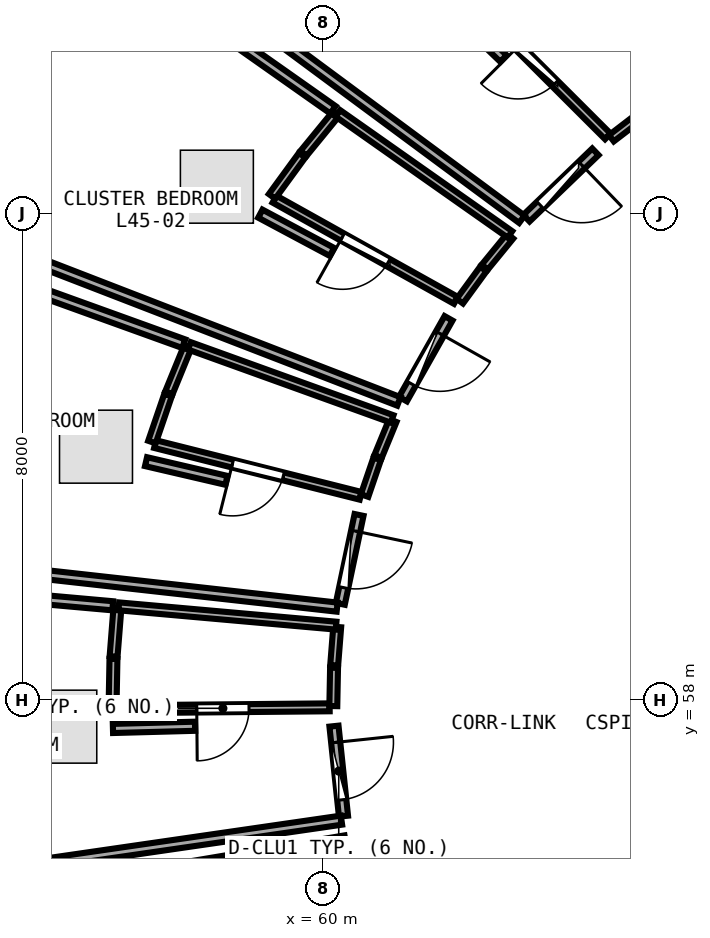
"""IFC4 building model, lengths in metres.
Left out: names, types, materials, properties, quantities, classifications, styles, units other than length and angle.
Written with IfcOpenShell. Run it as: python <this file> out.ifc"""

import sys

from ifc_helpers import new_model, si_unit, direction, frame, frame_2d, origin, place, context, subcontext, project, spatial, rectangle, extrude, element, fill, save


model = new_model("IFC4")
c1 = context("Model", 3, precision=1e-05, world=origin(), true_north=direction((0.0, 1.0)))
c2 = subcontext(c1, "Body", "Model", "MODEL_VIEW")
j1 = project(units=[si_unit("LENGTHUNIT", "METRE"), si_unit("PLANEANGLEUNIT", "RADIAN")], contexts=[c1])
p1 = place(None, origin())
s1 = spatial("IfcSite", under=j1, at=p1, CompositionType="ELEMENT")
p2 = place(p1, origin())
s2 = spatial("IfcBuilding", under=s1, at=p2, CompositionType="ELEMENT")
p3 = place(p2, frame((0.0, 0.0, 176.85)))
s3 = spatial("IfcBuildingStorey", under=s2, at=p3, CompositionType="ELEMENT", Elevation=176.85)
p4 = place(p3, frame((56.679, 71.1, 0.0), z_axis=(0.0, 0.0, 1.0), x_axis=(-0.538801521808, -0.842432739213, 0.0)))
e1 = element("IfcWall", 1, at=p4, inside=s3, PredefinedType="SOLIDWALL", context=c2, shape_type="SweptSolid", body=[
    extrude(rectangle(XDim=7.253, YDim=0.26, at=frame_2d((3.627, 0.0))), origin(), (0.0, 0.0, 1.0), 3.475),
])
p5 = place(p4, frame((3.152, 0.0, 0.0)))
e2 = element("IfcOpeningElement", 2, at=p5, cuts=e1, PredefinedType="OPENING", context=c2, shape_type="SweptSolid", body=[
    extrude(rectangle(XDim=0.95, YDim=2.1, at=frame_2d((0.475, 1.05))), frame((0.0, 0.14, 0.0), z_axis=(0.0, -1.0, 0.0), x_axis=(1.0, 0.0, 0.0)), (0.0, 0.0, 1.0), 0.28),
])
p6 = place(p4, frame((4.452, 0.0, 0.85)))
e3 = element("IfcOpeningElement", 3, at=p6, cuts=e1, PredefinedType="OPENING", context=c2, shape_type="SweptSolid", body=[
    extrude(rectangle(XDim=1.2, YDim=1.45, at=frame_2d((0.6, 0.725))), frame((0.0, 0.14, 0.0), z_axis=(0.0, -1.0, 0.0), x_axis=(1.0, 0.0, 0.0)), (0.0, 0.0, 1.0), 0.28),
])
p7 = place(p3, frame((64.687, 67.266, 0.0), z_axis=(0.0, 0.0, 1.0), x_axis=(-0.707694933746, 0.706518139011, 0.0)))
e4 = element("IfcWall", 4, at=p7, inside=s3, PredefinedType="PLUMBINGWALL", context=c2, shape_type="SweptSolid", body=[
    extrude(rectangle(XDim=3.319, YDim=0.13, at=frame_2d((1.66, 0.0))), origin(), (0.0, 0.0, 1.0), 3.175),
])
p8 = place(p7, frame((1.23, 0.0, 0.0)))
e5 = element("IfcOpeningElement", 5, at=p8, cuts=e4, PredefinedType="OPENING", context=c2, shape_type="SweptSolid", body=[
    extrude(rectangle(XDim=0.86, YDim=2.05, at=frame_2d((0.43, 1.025))), frame((0.0, 0.075, 0.0), z_axis=(0.0, -1.0, 0.0), x_axis=(1.0, 0.0, 0.0)), (0.0, 0.0, 1.0), 0.15),
])
p9 = place(p3, frame((64.482, 67.013, 0.0), z_axis=(0.0, 0.0, 1.0), x_axis=(-0.720543985977, -0.693409232901, 0.0)))
e6 = element("IfcWall", 6, at=p9, inside=s3, PredefinedType="PARTITIONING", context=c2, shape_type="SweptSolid", body=[
    extrude(rectangle(XDim=1.574, YDim=0.15, at=frame_2d((0.787, 0.0))), origin(), (0.0, 0.0, 1.0), 2.975),
])
p10 = place(p9, frame((0.312, 0.0, 0.0)))
e7 = element("IfcOpeningElement", 7, at=p10, cuts=e6, PredefinedType="OPENING", context=c2, shape_type="SweptSolid", body=[
    extrude(rectangle(XDim=0.95, YDim=2.08, at=frame_2d((0.475, 1.04))), frame((0.0, 0.085, 0.0), z_axis=(0.0, -1.0, 0.0), x_axis=(1.0, 0.0, 0.0)), (0.0, 0.0, 1.0), 0.17),
])
p11 = place(p3, frame((62.188, 64.57, 0.0), z_axis=(0.0, 0.0, 1.0), x_axis=(-0.873255694646, 0.487262241271, 0.0)))
e8 = element("IfcWall", 8, at=p11, inside=s3, PredefinedType="PLUMBINGWALL", context=c2, shape_type="SweptSolid", body=[
    extrude(rectangle(XDim=3.416, YDim=0.13, at=frame_2d((1.708, 0.0))), origin(), (0.0, 0.0, 1.0), 2.975),
])
p12 = place(p11, frame((1.278, 0.0, 0.0)))
e9 = element("IfcOpeningElement", 9, at=p12, cuts=e8, PredefinedType="OPENING", context=c2, shape_type="SweptSolid", body=[
    extrude(rectangle(XDim=0.86, YDim=2.05, at=frame_2d((0.43, 1.025))), frame((0.0, 0.075, 0.0), z_axis=(0.0, -1.0, 0.0), x_axis=(1.0, 0.0, 0.0)), (0.0, 0.0, 1.0), 0.15),
])
p13 = place(p3, frame((62.066, 64.275, 0.0), z_axis=(0.0, 0.0, 1.0), x_axis=(-0.491582624537, -0.870830938388, 0.0)))
e10 = element("IfcWall", 10, at=p13, inside=s3, PredefinedType="PARTITIONING", context=c2, shape_type="SweptSolid", body=[
    extrude(rectangle(XDim=1.526, YDim=0.15, at=frame_2d((0.763, 0.0))), origin(), (0.0, 0.0, 1.0), 3.235),
])
p14 = place(p13, frame((0.288, 0.0, 0.0)))
e11 = element("IfcOpeningElement", 11, at=p14, cuts=e10, PredefinedType="OPENING", context=c2, shape_type="SweptSolid", body=[
    extrude(rectangle(XDim=0.95, YDim=2.08, at=frame_2d((0.475, 1.04))), frame((0.0, 0.085, 0.0), z_axis=(0.0, -1.0, 0.0), x_axis=(1.0, 0.0, 0.0)), (0.0, 0.0, 1.0), 0.17),
])
p15 = place(p3, frame((60.621, 61.356, 0.0), z_axis=(0.0, 0.0, 1.0), x_axis=(-0.969774737706, 0.244001963326, 0.0)))
e12 = element("IfcWall", 12, at=p15, inside=s3, PredefinedType="PLUMBINGWALL", context=c2, shape_type="SweptSolid", body=[
    extrude(rectangle(XDim=3.486, YDim=0.13, at=frame_2d((1.743, 0.0))), origin(), (0.0, 0.0, 1.0), 3.175),
])
p16 = place(p15, frame((1.313, 0.0, 0.0)))
e13 = element("IfcOpeningElement", 13, at=p16, cuts=e12, PredefinedType="OPENING", context=c2, shape_type="SweptSolid", body=[
    extrude(rectangle(XDim=0.86, YDim=2.05, at=frame_2d((0.43, 1.025))), frame((0.0, 0.075, 0.0), z_axis=(0.0, -1.0, 0.0), x_axis=(1.0, 0.0, 0.0)), (0.0, 0.0, 1.0), 0.15),
])
p17 = place(p3, frame((60.594, 61.041, 0.0), z_axis=(0.0, 0.0, 1.0), x_axis=(-0.206257580925, -0.978497731378, 0.0)))
e14 = element("IfcWall", 14, at=p17, inside=s3, PredefinedType="PARTITIONING", context=c2, shape_type="SweptSolid", body=[
    extrude(rectangle(XDim=1.494, YDim=0.15, at=frame_2d((0.747, 0.0))), origin(), (0.0, 0.0, 1.0), 3.48),
])
p18 = place(p17, frame((0.272, 0.0, 0.0)))
e15 = element("IfcOpeningElement", 15, at=p18, cuts=e14, PredefinedType="OPENING", context=c2, shape_type="SweptSolid", body=[
    extrude(rectangle(XDim=0.95, YDim=2.08, at=frame_2d((0.475, 1.04))), frame((0.0, 0.085, 0.0), z_axis=(0.0, -1.0, 0.0), x_axis=(1.0, 0.0, 0.0)), (0.0, 0.0, 1.0), 0.17),
])
p19 = place(p3, frame((60.111, 57.877, 0.0), z_axis=(0.0, 0.0, 1.0), x_axis=(-0.999958513443, -0.009108863449, 0.0)))
e16 = element("IfcWall", 16, at=p19, inside=s3, PredefinedType="PLUMBINGWALL", context=c2, shape_type="SweptSolid", body=[
    extrude(rectangle(XDim=3.511, YDim=0.13, at=frame_2d((1.756, 0.0))), origin(), (0.0, 0.0, 1.0), 2.975),
])
p20 = place(p19, frame((1.326, 0.0, 0.0)))
e17 = element("IfcOpeningElement", 17, at=p20, cuts=e16, PredefinedType="OPENING", context=c2, shape_type="SweptSolid", body=[
    extrude(rectangle(XDim=0.86, YDim=2.05, at=frame_2d((0.43, 1.025))), frame((0.0, 0.075, 0.0), z_axis=(0.0, -1.0, 0.0), x_axis=(1.0, 0.0, 0.0)), (0.0, 0.0, 1.0), 0.15),
])
p21 = place(p3, frame((60.182, 57.568, 0.0), z_axis=(0.0, 0.0, 1.0), x_axis=(0.104940843895, -0.994478465972, 0.0)))
e18 = element("IfcWall", 18, at=p21, inside=s3, PredefinedType="PARTITIONING", context=c2, shape_type="SweptSolid", body=[
    extrude(rectangle(XDim=1.489, YDim=0.15, at=frame_2d((0.745, 0.0))), origin(), (0.0, 0.0, 1.0), 3.48),
])
p22 = place(p21, frame((0.269, 0.0, 0.0)))
e19 = element("IfcOpeningElement", 19, at=p22, cuts=e18, PredefinedType="OPENING", context=c2, shape_type="SweptSolid", body=[
    extrude(rectangle(XDim=0.95, YDim=2.08, at=frame_2d((0.475, 1.04))), frame((0.0, 0.085, 0.0), z_axis=(0.0, -1.0, 0.0), x_axis=(1.0, 0.0, 0.0)), (0.0, 0.0, 1.0), 0.17),
])
p23 = place(p3, frame((60.423, 55.673, 0.0), z_axis=(0.0, 0.0, 1.0), x_axis=(0.338221551274, -0.941066513193, 0.0)))
e20 = element("IfcWall", 20, at=p23, inside=s3, PredefinedType="PARTITIONING", context=c2, shape_type="SweptSolid", body=[
    extrude(rectangle(XDim=3.108, YDim=0.12, at=frame_2d((1.554, 0.0))), origin(), (0.0, 0.0, 1.0), 3.235),
])
p24 = place(p23, frame((1.104, 0.0, 0.0)))
e21 = element("IfcOpeningElement", 21, at=p24, cuts=e20, PredefinedType="OPENING", context=c2, shape_type="SweptSolid", body=[
    extrude(rectangle(XDim=0.9, YDim=2.08, at=frame_2d((0.45, 1.04))), frame((0.0, 0.07, 0.0), z_axis=(0.0, -1.0, 0.0), x_axis=(1.0, 0.0, 0.0)), (0.0, 0.0, 1.0), 0.14),
])
p25 = place(p3, frame((66.242, 68.337, 0.0), z_axis=(0.0, 0.0, 1.0), x_axis=(-0.598416617992, 0.801185091793, 0.0)))
e22 = element("IfcWall", 22, at=p25, inside=s3, PredefinedType="PARTITIONING", context=c2, shape_type="SweptSolid", body=[
    extrude(rectangle(XDim=7.629, YDim=0.1, at=frame_2d((3.814, 0.0))), origin(), (0.0, 0.0, 1.0), 2.975),
])
p26 = place(p3, frame((65.281, 67.648, 0.0), z_axis=(0.0, 0.0, 1.0), x_axis=(-0.793187600036, -0.608977365055, 0.0)))
e23 = element("IfcWall", 23, at=p26, inside=s3, PredefinedType="PLUMBINGWALL", context=c2, shape_type="SweptSolid", body=[
    extrude(rectangle(XDim=0.676, YDim=0.13, at=frame_2d((0.338, 0.0))), origin(), (0.0, 0.0, 1.0), 2.975),
])
p27 = place(p3, frame((63.773, 70.706, 0.0), z_axis=(0.0, 0.0, 1.0), x_axis=(0.625916574892, -0.779890018704, 0.0)))
e24 = element("IfcWall", 24, at=p27, inside=s3, PredefinedType="PLUMBINGWALL", context=c2, shape_type="SweptSolid", body=[
    extrude(rectangle(XDim=3.362, YDim=0.13, at=frame_2d((1.681, 0.0))), origin(), (0.0, 0.0, 1.0), 2.975),
])
p28 = place(p3, frame((63.272, 65.904, 0.0), z_axis=(0.0, 0.0, 1.0), x_axis=(-0.803728632682, 0.594996037808, 0.0)))
e25 = element("IfcWall", 25, at=p28, inside=s3, PredefinedType="PARTITIONING", context=c2, shape_type="SweptSolid", body=[
    extrude(rectangle(XDim=6.886, YDim=0.15, at=frame_2d((3.443, 0.0))), origin(), (0.0, 0.0, 1.0), 3.175),
])
p29 = place(p3, frame((62.039, 69.441, 0.0), z_axis=(0.0, 0.0, 1.0), x_axis=(0.721428898705, -0.692488515511, 0.0)))
e26 = element("IfcWall", 26, at=p29, inside=s3, PredefinedType="PARTITIONING", context=c2, shape_type="SweptSolid", body=[
    extrude(rectangle(XDim=1.291, YDim=0.15, at=frame_2d((0.646, 0.0))), origin(), (0.0, 0.0, 1.0), 3.175),
])
p30 = place(p3, frame((63.08, 65.627, 0.0), z_axis=(0.0, 0.0, 1.0), x_axis=(-0.633641038052, -0.773627193741, 0.0)))
e27 = element("IfcWall", 27, at=p30, inside=s3, PredefinedType="PLUMBINGWALL", context=c2, shape_type="SweptSolid", body=[
    extrude(rectangle(XDim=0.659, YDim=0.13, at=frame_2d((0.33, 0.0))), origin(), (0.0, 0.0, 1.0), 3.48),
])
p31 = place(p3, frame((62.638, 65.086, 0.0), z_axis=(0.0, 0.0, 1.0), x_axis=(-0.590053970957, -0.807363803596, 0.0)))
e28 = element("IfcWall", 28, at=p31, inside=s3, PredefinedType="PLUMBINGWALL", context=c2, shape_type="SweptSolid", body=[
    extrude(rectangle(XDim=0.655, YDim=0.13, at=frame_2d((0.328, 0.0))), origin(), (0.0, 0.0, 1.0), 2.975),
])
p32 = place(p3, frame((59.164, 66.28, 0.0), z_axis=(0.0, 0.0, 1.0), x_axis=(0.589885116714, 0.807487181991, 0.0)))
e29 = element("IfcWall", 29, at=p32, inside=s3, PredefinedType="PLUMBINGWALL", context=c2, shape_type="SweptSolid", body=[
    extrude(rectangle(XDim=0.838, YDim=0.13, at=frame_2d((0.419, 0.0))), origin(), (0.0, 0.0, 1.0), 3.48),
])
p33 = place(p3, frame((59.683, 66.989, 0.0), z_axis=(0.0, 0.0, 1.0), x_axis=(0.633474035481, 0.773763947449, 0.0)))
e30 = element("IfcWall", 30, at=p33, inside=s3, PredefinedType="PLUMBINGWALL", context=c2, shape_type="SweptSolid", body=[
    extrude(rectangle(XDim=0.844, YDim=0.13, at=frame_2d((0.422, 0.0))), origin(), (0.0, 0.0, 1.0), 3.175),
])
p34 = place(p3, frame((60.246, 67.646, 0.0), z_axis=(0.0, 0.0, 1.0), x_axis=(0.817907250539, -0.575350093, 0.0)))
e31 = element("IfcWall", 31, at=p34, inside=s3, PredefinedType="PLUMBINGWALL", context=c2, shape_type="SweptSolid", body=[
    extrude(rectangle(XDim=3.46, YDim=0.13, at=frame_2d((1.73, 0.0))), origin(), (0.0, 0.0, 1.0), 3.175),
])
p35 = place(p3, frame((61.25, 62.908, 0.0), z_axis=(0.0, 0.0, 1.0), x_axis=(-0.932687580633, 0.360685287936, 0.0)))
e32 = element("IfcWall", 32, at=p35, inside=s3, PredefinedType="PARTITIONING", context=c2, shape_type="SweptSolid", body=[
    extrude(rectangle(XDim=8.052, YDim=0.15, at=frame_2d((4.026, 0.0))), origin(), (0.0, 0.0, 1.0), 2.975),
])
p36 = place(p3, frame((56.62, 70.201, 0.0), z_axis=(0.0, 0.0, 1.0), x_axis=(0.817617957458, -0.575761127241, 0.0)))
e33 = element("IfcWall", 33, at=p36, inside=s3, PredefinedType="PARTITIONING", context=c2, shape_type="SweptSolid", body=[
    extrude(rectangle(XDim=4.337, YDim=0.15, at=frame_2d((2.168, 0.0))), origin(), (0.0, 0.0, 1.0), 3.025),
])
p37 = place(p3, frame((58.971, 65.996, 0.0), z_axis=(0.0, 0.0, 1.0), x_axis=(0.882039066957, -0.471176277376, 0.0)))
e34 = element("IfcWall", 34, at=p37, inside=s3, PredefinedType="PARTITIONING", context=c2, shape_type="SweptSolid", body=[
    extrude(rectangle(XDim=1.336, YDim=0.15, at=frame_2d((0.668, 0.0))), origin(), (0.0, 0.0, 1.0), 3.175),
])
p38 = place(p3, frame((61.15, 62.594, 0.0), z_axis=(0.0, 0.0, 1.0), x_axis=(-0.38036677213, -0.924835725229, 0.0)))
e35 = element("IfcWall", 35, at=p38, inside=s3, PredefinedType="PLUMBINGWALL", context=c2, shape_type="SweptSolid", body=[
    extrude(rectangle(XDim=0.641, YDim=0.13, at=frame_2d((0.321, 0.0))), origin(), (0.0, 0.0, 1.0), 3.235),
])
p39 = place(p3, frame((60.893, 61.964, 0.0), z_axis=(0.0, 0.0, 1.0), x_axis=(-0.324128876048, -0.94601293422, 0.0)))
e36 = element("IfcWall", 36, at=p39, inside=s3, PredefinedType="PLUMBINGWALL", context=c2, shape_type="SweptSolid", body=[
    extrude(rectangle(XDim=0.639, YDim=0.13, at=frame_2d((0.319, 0.0))), origin(), (0.0, 0.0, 1.0), 3.48),
])
p40 = place(p3, frame((57.188, 62.24, 0.0), z_axis=(0.0, 0.0, 1.0), x_axis=(0.324370140969, 0.945930236142, 0.0)))
e37 = element("IfcWall", 37, at=p40, inside=s3, PredefinedType="PLUMBINGWALL", context=c2, shape_type="SweptSolid", body=[
    extrude(rectangle(XDim=0.817, YDim=0.13, at=frame_2d((0.409, 0.0))), origin(), (0.0, 0.0, 1.0), 3.48),
])
p41 = place(p3, frame((57.468, 63.051, 0.0), z_axis=(0.0, 0.0, 1.0), x_axis=(0.378505488692, 0.92559904658, 0.0)))
e38 = element("IfcWall", 38, at=p41, inside=s3, PredefinedType="PLUMBINGWALL", context=c2, shape_type="SweptSolid", body=[
    extrude(rectangle(XDim=0.821, YDim=0.13, at=frame_2d((0.411, 0.0))), origin(), (0.0, 0.0, 1.0), 3.48),
])
p42 = place(p3, frame((57.805, 63.822, 0.0), z_axis=(0.0, 0.0, 1.0), x_axis=(0.940709042882, -0.339214528935, 0.0)))
e39 = element("IfcWall", 39, at=p42, inside=s3, PredefinedType="PLUMBINGWALL", context=c2, shape_type="SweptSolid", body=[
    extrude(rectangle(XDim=3.545, YDim=0.13, at=frame_2d((1.772, 0.0))), origin(), (0.0, 0.0, 1.0), 3.175),
])
p43 = place(p3, frame((60.234, 59.525, 0.0), z_axis=(0.0, 0.0, 1.0), x_axis=(-0.99385157858, 0.110720548017, 0.0)))
e40 = element("IfcWall", 40, at=p43, inside=s3, PredefinedType="PARTITIONING", context=c2, shape_type="SweptSolid", body=[
    extrude(rectangle(XDim=8.158, YDim=0.15, at=frame_2d((4.079, 0.0))), origin(), (0.0, 0.0, 1.0), 3.025),
])
p44 = place(p3, frame((53.535, 65.365, 0.0), z_axis=(0.0, 0.0, 1.0), x_axis=(0.940657292565, -0.339358008517, 0.0)))
e41 = element("IfcWall", 41, at=p44, inside=s3, PredefinedType="PARTITIONING", context=c2, shape_type="SweptSolid", body=[
    extrude(rectangle(XDim=4.44, YDim=0.15, at=frame_2d((2.22, 0.0))), origin(), (0.0, 0.0, 1.0), 2.975),
])
p45 = place(p3, frame((57.091, 61.918, 0.0), z_axis=(0.0, 0.0, 1.0), x_axis=(0.973980333704, -0.226632543023, 0.0)))
e42 = element("IfcWall", 42, at=p45, inside=s3, PredefinedType="PARTITIONING", context=c2, shape_type="SweptSolid", body=[
    extrude(rectangle(XDim=1.357, YDim=0.15, at=frame_2d((0.679, 0.0))), origin(), (0.0, 0.0, 1.0), 3.175),
])
p46 = place(p3, frame((60.235, 59.199, 0.0), z_axis=(0.0, 0.0, 1.0), x_axis=(-0.078763069799, -0.996893363824, 0.0)))
e43 = element("IfcWall", 43, at=p46, inside=s3, PredefinedType="PLUMBINGWALL", context=c2, shape_type="SweptSolid", body=[
    extrude(rectangle(XDim=0.632, YDim=0.13, at=frame_2d((0.316, 0.0))), origin(), (0.0, 0.0, 1.0), 3.48),
])
p47 = place(p3, frame((60.184, 58.529, 0.0), z_axis=(0.0, 0.0, 1.0), x_axis=(-0.019338742534, -0.999812989032, 0.0)))
e44 = element("IfcWall", 44, at=p47, inside=s3, PredefinedType="PLUMBINGWALL", context=c2, shape_type="SweptSolid", body=[
    extrude(rectangle(XDim=0.631, YDim=0.13, at=frame_2d((0.315, 0.0))), origin(), (0.0, 0.0, 1.0), 2.975),
])
p48 = place(p3, frame((56.54, 57.865, 0.0), z_axis=(0.0, 0.0, 1.0), x_axis=(0.019006825377, 0.999819353978, 0.0)))
e45 = element("IfcWall", 45, at=p48, inside=s3, PredefinedType="PLUMBINGWALL", context=c2, shape_type="SweptSolid", body=[
    extrude(rectangle(XDim=0.809, YDim=0.13, at=frame_2d((0.405, 0.0))), origin(), (0.0, 0.0, 1.0), 2.975),
])
p49 = place(p3, frame((56.558, 58.714, 0.0), z_axis=(0.0, 0.0, 1.0), x_axis=(0.078797232985, 0.996890664052, 0.0)))
e46 = element("IfcWall", 46, at=p49, inside=s3, PredefinedType="PLUMBINGWALL", context=c2, shape_type="SweptSolid", body=[
    extrude(rectangle(XDim=0.809, YDim=0.13, at=frame_2d((0.404, 0.0))), origin(), (0.0, 0.0, 1.0), 3.48),
])
p50 = place(p3, frame((56.643, 59.538, 0.0), z_axis=(0.0, 0.0, 1.0), x_axis=(0.99608063721, -0.088449783359, 0.0)))
e47 = element("IfcWall", 47, at=p50, inside=s3, PredefinedType="PLUMBINGWALL", context=c2, shape_type="SweptSolid", body=[
    extrude(rectangle(XDim=3.588, YDim=0.13, at=frame_2d((1.794, 0.0))), origin(), (0.0, 0.0, 1.0), 3.175),
])
p51 = place(p3, frame((60.305, 56.022, 0.0), z_axis=(0.0, 0.0, 1.0), x_axis=(-0.989635565405, -0.143601698061, 0.0)))
e48 = element("IfcWall", 48, at=p51, inside=s3, PredefinedType="PARTITIONING", context=c2, shape_type="SweptSolid", body=[
    extrude(rectangle(XDim=8.15, YDim=0.15, at=frame_2d((4.075, 0.0))), origin(), (0.0, 0.0, 1.0), 3.025),
])
p52 = place(p3, frame((52.066, 59.947, 0.0), z_axis=(0.0, 0.0, 1.0), x_axis=(0.996054097512, -0.088748153952, 0.0)))
e49 = element("IfcWall", 49, at=p52, inside=s3, PredefinedType="PARTITIONING", context=c2, shape_type="SweptSolid", body=[
    extrude(rectangle(XDim=4.495, YDim=0.15, at=frame_2d((2.248, 0.0))), origin(), (0.0, 0.0, 1.0), 3.025),
])
p53 = place(p3, frame((56.547, 57.53, 0.0), z_axis=(0.0, 0.0, 1.0), x_axis=(0.999637471643, 0.026924436601, 0.0)))
e50 = element("IfcWall", 50, at=p53, inside=s3, PredefinedType="PARTITIONING", context=c2, shape_type="SweptSolid", body=[
    extrude(rectangle(XDim=1.351, YDim=0.15, at=frame_2d((0.676, 0.0))), origin(), (0.0, 0.0, 1.0), 3.175),
])
p54 = place(p3, frame((52.331, 54.374, 0.0), z_axis=(0.0, 0.0, 1.0), x_axis=(0.986190638786, 0.165614081438, 0.0)))
e51 = element("IfcWall", 51, at=p54, inside=s3, PredefinedType="PARTITIONING", context=c2, shape_type="SweptSolid", body=[
    extrude(rectangle(XDim=8.145, YDim=0.1, at=frame_2d((4.072, 0.0))), origin(), (0.0, 0.0, 1.0), 3.025),
])
p55 = place(p8, origin())
e52 = element("IfcDoor", 52, at=p55, inside=s3, OperationType="SINGLE_SWING_RIGHT", PredefinedType="DOOR", context=c2, shape_type="SweptSolid", body=[
    extrude(rectangle(XDim=0.86, YDim=2.05, at=frame_2d((0.43, 1.025))), frame((0.0, 0.025, 0.0), z_axis=(0.0, -1.0, 0.0), x_axis=(1.0, 0.0, 0.0)), (0.0, 0.0, 1.0), 0.05),
])
fill(e5, e52)
p56 = place(p10, origin())
e53 = element("IfcDoor", 53, at=p56, inside=s3, OperationType="SINGLE_SWING_LEFT", PredefinedType="DOOR", context=c2, shape_type="SweptSolid", body=[
    extrude(rectangle(XDim=0.95, YDim=2.08, at=frame_2d((0.475, 1.04))), frame((0.0, 0.025, 0.0), z_axis=(0.0, -1.0, 0.0), x_axis=(1.0, 0.0, 0.0)), (0.0, 0.0, 1.0), 0.05),
])
fill(e7, e53)
p57 = place(p12, origin())
e54 = element("IfcDoor", 54, at=p57, inside=s3, OperationType="SINGLE_SWING_RIGHT", PredefinedType="DOOR", context=c2, shape_type="SweptSolid", body=[
    extrude(rectangle(XDim=0.86, YDim=2.05, at=frame_2d((0.43, 1.025))), frame((0.0, 0.025, 0.0), z_axis=(0.0, -1.0, 0.0), x_axis=(1.0, 0.0, 0.0)), (0.0, 0.0, 1.0), 0.05),
])
fill(e9, e54)
p58 = place(p14, origin())
e55 = element("IfcDoor", 55, at=p58, inside=s3, OperationType="SINGLE_SWING_LEFT", PredefinedType="DOOR", context=c2, shape_type="SweptSolid", body=[
    extrude(rectangle(XDim=0.95, YDim=2.08, at=frame_2d((0.475, 1.04))), frame((0.0, 0.025, 0.0), z_axis=(0.0, -1.0, 0.0), x_axis=(1.0, 0.0, 0.0)), (0.0, 0.0, 1.0), 0.05),
])
fill(e11, e55)
p59 = place(p16, origin())
e56 = element("IfcDoor", 56, at=p59, inside=s3, OperationType="SINGLE_SWING_RIGHT", PredefinedType="DOOR", context=c2, shape_type="SweptSolid", body=[
    extrude(rectangle(XDim=0.86, YDim=2.05, at=frame_2d((0.43, 1.025))), frame((0.0, 0.025, 0.0), z_axis=(0.0, -1.0, 0.0), x_axis=(1.0, 0.0, 0.0)), (0.0, 0.0, 1.0), 0.05),
])
fill(e13, e56)
p60 = place(p18, origin())
e57 = element("IfcDoor", 57, at=p60, inside=s3, OperationType="SINGLE_SWING_LEFT", PredefinedType="DOOR", context=c2, shape_type="SweptSolid", body=[
    extrude(rectangle(XDim=0.95, YDim=2.08, at=frame_2d((0.475, 1.04))), frame((0.0, 0.025, 0.0), z_axis=(0.0, -1.0, 0.0), x_axis=(1.0, 0.0, 0.0)), (0.0, 0.0, 1.0), 0.05),
])
fill(e15, e57)
p61 = place(p20, origin())
e58 = element("IfcDoor", 58, at=p61, inside=s3, OperationType="SINGLE_SWING_RIGHT", PredefinedType="DOOR", context=c2, shape_type="SweptSolid", body=[
    extrude(rectangle(XDim=0.86, YDim=2.05, at=frame_2d((0.43, 1.025))), frame((0.0, 0.025, 0.0), z_axis=(0.0, -1.0, 0.0), x_axis=(1.0, 0.0, 0.0)), (0.0, 0.0, 1.0), 0.05),
])
fill(e17, e58)
p62 = place(p22, origin())
e59 = element("IfcDoor", 59, at=p62, inside=s3, OperationType="SINGLE_SWING_LEFT", PredefinedType="DOOR", context=c2, shape_type="SweptSolid", body=[
    extrude(rectangle(XDim=0.95, YDim=2.08, at=frame_2d((0.475, 1.04))), frame((0.0, 0.025, 0.0), z_axis=(0.0, -1.0, 0.0), x_axis=(1.0, 0.0, 0.0)), (0.0, 0.0, 1.0), 0.05),
])
fill(e19, e59)
save(model, sys.argv[1])
